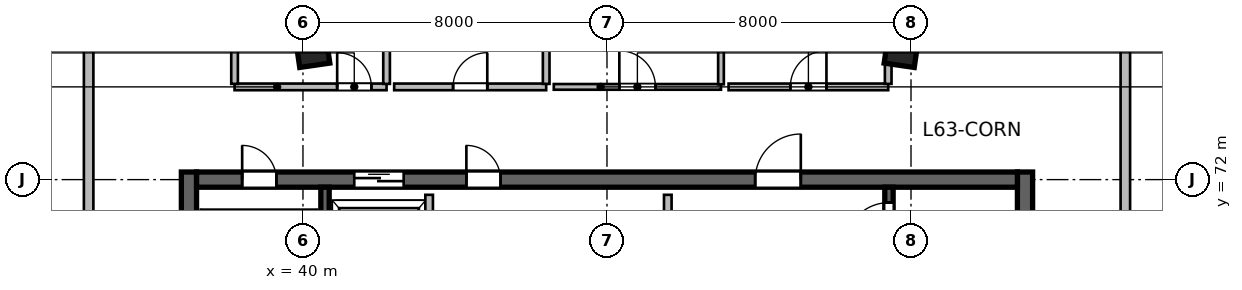
"""IFC4 building model, lengths in metres.
Left out: names, types, materials, properties, quantities, classifications, styles, units other than length and angle.
Written with IfcOpenShell. Run it as: python <this file> out.ifc"""

import sys

from ifc_helpers import new_model, si_unit, direction, frame, frame_2d, origin, origin_2d, place, context, subcontext, project, spatial, rectangle, extrude, source, transform, mapped, element, fill, save


model = new_model("IFC4")
c1 = context("Model", 3, precision=1e-05, world=origin(), true_north=direction((0.0, 1.0)))
c2 = subcontext(c1, "Body", "Model", "MODEL_VIEW")
j1 = project(units=[si_unit("LENGTHUNIT", "METRE"), si_unit("PLANEANGLEUNIT", "RADIAN")], contexts=[c1])
p1 = place(None, origin())
s1 = spatial("IfcSite", under=j1, at=p1, CompositionType="ELEMENT")
p2 = place(p1, origin())
s2 = spatial("IfcBuilding", under=s1, at=p2, CompositionType="ELEMENT")
p3 = place(p2, frame((0.0, 0.0, 260.1)))
s3 = spatial("IfcBuildingStorey", under=s2, at=p3, CompositionType="ELEMENT", Elevation=260.1)
m1 = source(origin(), c2, "Body", "SweptSolid", [
    extrude(rectangle(XDim=12.0, YDim=0.4, at=frame_2d((6.0, 0.0))), origin(), (0.0, 0.0, 1.0), 3.9),
])
for number, where, z_axis, x_axis in (
    (1, (37.0, 60.2, 0.0), (0.0, 0.0, 1.0), (0.0, 1.0, 0.0)),
    (2, (59.0, 60.2, 0.0), (0.0, 0.0, 1.0), (0.0, 1.0, 0.0)),
):
    element("IfcWall", number, at=place(p3, frame(where, z_axis=z_axis, x_axis=x_axis)), inside=s3, PredefinedType="SHEAR", context=c2, shape_type="MappedRepresentation", body=[
        mapped(m1, transform((0.0, 0.0, 0.0), scale=1.0)),
    ])
m2 = source(origin(), c2, "Body", "SweptSolid", [
    extrude(rectangle(XDim=21.6, YDim=0.4, at=frame_2d((10.8, 0.0))), origin(), (0.0, 0.0, 1.0), 3.9),
])
p4 = place(p3, frame((37.2, 72.0, 0.0), z_axis=(0.0, 0.0, 1.0), x_axis=(1.0, 0.0, 0.0)))
e3 = element("IfcWall", 3, at=p4, inside=s3, PredefinedType="SHEAR", context=c2, shape_type="MappedRepresentation", body=[
    mapped(m2, transform((0.0, 0.0, 0.0), scale=1.0)),
])
p5 = place(p4, frame((1.2, 0.0, 0.0)))
e4 = element("IfcOpeningElement", 4, at=p5, cuts=e3, PredefinedType="OPENING", context=c2, shape_type="SweptSolid", body=[
    extrude(rectangle(XDim=0.9, YDim=2.1, at=frame_2d((0.45, 1.05))), frame((0.0, 0.21, 0.0), z_axis=(0.0, -1.0, 0.0), x_axis=(1.0, 0.0, 0.0)), (0.0, 0.0, 1.0), 0.42),
])
p6 = place(p4, frame((14.7, 0.0, 0.0)))
e5 = element("IfcOpeningElement", 5, at=p6, cuts=e3, PredefinedType="OPENING", context=c2, shape_type="SweptSolid", body=[
    extrude(rectangle(XDim=1.2, YDim=2.15, at=frame_2d((0.6, 1.075))), frame((0.0, 0.21, 0.0), z_axis=(0.0, -1.0, 0.0), x_axis=(1.0, 0.0, 0.0)), (0.0, 0.0, 1.0), 0.42),
])
p7 = place(p4, frame((4.15, 0.0, 0.0)))
e6 = element("IfcOpeningElement", 6, at=p7, cuts=e3, PredefinedType="OPENING", context=c2, shape_type="SweptSolid", body=[
    extrude(rectangle(XDim=1.3, YDim=2.15, at=frame_2d((0.65, 1.075))), frame((0.0, 0.21, 0.0), z_axis=(0.0, -1.0, 0.0), x_axis=(1.0, 0.0, 0.0)), (0.0, 0.0, 1.0), 0.42),
])
p8 = place(p4, frame((7.1, 0.0, 0.0)))
e7 = element("IfcOpeningElement", 7, at=p8, cuts=e3, PredefinedType="OPENING", context=c2, shape_type="SweptSolid", body=[
    extrude(rectangle(XDim=0.9, YDim=2.1, at=frame_2d((0.45, 1.05))), frame((0.0, 0.21, 0.0), z_axis=(0.0, -1.0, 0.0), x_axis=(1.0, 0.0, 0.0)), (0.0, 0.0, 1.0), 0.42),
])
m3 = source(origin(), c2, "Body", "SweptSolid", [
    extrude(rectangle(XDim=11.2, YDim=0.22, at=frame_2d((5.6, 0.0))), origin(), (0.0, 0.0, 1.0), 3.9),
])
p9 = place(p3, frame((40.58, 60.6, 0.0), z_axis=(0.0, 0.0, 1.0), x_axis=(0.0, 1.0, 0.0)))
e8 = element("IfcWall", 8, at=p9, inside=s3, PredefinedType="SHEAR", context=c2, shape_type="MappedRepresentation", body=[
    mapped(m3, transform((0.0, 0.0, 0.0), scale=1.0)),
])
p10 = place(p3, frame((55.42, 60.6, 0.0), z_axis=(0.0, 0.0, 1.0), x_axis=(0.0, 1.0, 0.0)))
e9 = element("IfcWall", 9, at=p10, inside=s3, PredefinedType="SHEAR", context=c2, shape_type="MappedRepresentation", body=[
    mapped(m3, transform((0.0, 0.0, 0.0), scale=1.0)),
])
p11 = place(p10, frame((9.645, 0.0, 0.0)))
e10 = element("IfcOpeningElement", 10, at=p11, cuts=e9, PredefinedType="OPENING", context=c2, shape_type="SweptSolid", body=[
    extrude(rectangle(XDim=1.15, YDim=2.15, at=frame_2d((0.575, 1.075))), frame((0.0, 0.12, 0.0), z_axis=(0.0, -1.0, 0.0), x_axis=(1.0, 0.0, 0.0)), (0.0, 0.0, 1.0), 0.24),
])
m4 = source(origin(), c2, "Body", "SweptSolid", [
    extrude(rectangle(XDim=0.8, YDim=0.8, at=origin_2d()), origin(), (0.0, 0.0, 1.0), 3.9),
])
for number, where, z_axis, x_axis in (
    (11, (40.253, 75.404, 0.0), (0.0, 0.0, 1.0), (-0.143, 0.99, 0.0)),
    (12, (55.747, 75.404, 0.0), (0.0, 0.0, 1.0), (0.143, 0.99, 0.0)),
):
    element("IfcColumn", number, at=place(p3, frame(where, z_axis=z_axis, x_axis=x_axis)), inside=s3, PredefinedType="COLUMN", context=c2, shape_type="MappedRepresentation", body=[
        mapped(m4, transform((0.0, 0.0, 0.0), scale=1.0)),
    ])
m5 = source(origin(), c2, "Body", "SweptSolid", [
    extrude(rectangle(XDim=5.8, YDim=0.2, at=frame_2d((2.9, 0.0))), origin(), (0.0, 0.0, 1.0), 3.65),
])
p12 = place(p3, frame((49.6, 65.8, 0.0), z_axis=(0.0, 0.0, 1.0), x_axis=(0.0, 1.0, 0.0)))
e13 = element("IfcWall", 13, at=p12, inside=s3, PredefinedType="SOLIDWALL", context=c2, shape_type="MappedRepresentation", body=[
    mapped(m5, transform((0.0, 0.0, 0.0), scale=1.0)),
])
m6 = source(origin(), c2, "Body", "SweptSolid", [
    extrude(rectangle(XDim=3.2, YDim=0.2, at=frame_2d((1.6, 0.0))), origin(), (0.0, 0.0, 1.0), 3.65),
])
p13 = place(p3, frame((43.32, 68.4, 0.0), z_axis=(0.0, 0.0, 1.0), x_axis=(0.0, 1.0, 0.0)))
e14 = element("IfcWall", 14, at=p13, inside=s3, PredefinedType="SOLIDWALL", context=c2, shape_type="MappedRepresentation", body=[
    mapped(m6, transform((0.0, 0.0, 0.0), scale=1.0)),
])
m7 = source(origin(), c2, "Body", "SweptSolid", [
    extrude(rectangle(XDim=4.0, YDim=0.175, at=frame_2d((2.0, 0.0))), origin(), (0.0, 0.0, 1.0), 3.65),
])
p14 = place(p3, frame((38.2, 74.44, 0.0), z_axis=(0.0, 0.0, 1.0), x_axis=(1.0, 0.0, 0.0)))
e15 = element("IfcWall", 15, at=p14, inside=s3, PredefinedType="PARTITIONING", context=c2, shape_type="MappedRepresentation", body=[
    mapped(m7, transform((0.0, 0.0, 0.0), scale=1.0)),
])
p15 = place(p14, frame((2.7, 0.0, 0.0)))
e16 = element("IfcOpeningElement", 16, at=p15, cuts=e15, PredefinedType="OPENING", context=c2, shape_type="SweptSolid", body=[
    extrude(rectangle(XDim=0.9, YDim=2.08, at=frame_2d((0.45, 1.04))), frame((0.0, 0.098, 0.0), z_axis=(0.0, -1.0, 0.0), x_axis=(1.0, 0.0, 0.0)), (0.0, 0.0, 1.0), 0.195),
])
m8 = source(origin(), c2, "Body", "SweptSolid", [
    extrude(rectangle(XDim=2.403, YDim=0.175, at=frame_2d((1.201, 0.0))), origin(), (0.0, 0.0, 1.0), 3.65),
])
for number, where, z_axis, x_axis in (
    (17, (38.2, 74.519, 0.0), (0.0, 0.0, 1.0), (0.0, 1.0, 0.0)),
    (18, (42.2, 74.519, 0.0), (0.0, 0.0, 1.0), (0.0, 1.0, 0.0)),
):
    element("IfcWall", number, at=place(p3, frame(where, z_axis=z_axis, x_axis=x_axis)), inside=s3, PredefinedType="PARTITIONING", context=c2, shape_type="MappedRepresentation", body=[
        mapped(m8, transform((0.0, 0.0, 0.0), scale=1.0)),
    ])
p16 = place(p3, frame((42.4, 74.44, 0.0), z_axis=(0.0, 0.0, 1.0), x_axis=(1.0, 0.0, 0.0)))
e19 = element("IfcWall", 19, at=p16, inside=s3, PredefinedType="PARTITIONING", context=c2, shape_type="MappedRepresentation", body=[
    mapped(m7, transform((0.0, 0.0, 0.0), scale=1.0)),
])
p17 = place(p16, frame((1.55, 0.0, 0.0)))
e20 = element("IfcOpeningElement", 20, at=p17, cuts=e19, PredefinedType="OPENING", context=c2, shape_type="SweptSolid", body=[
    extrude(rectangle(XDim=0.9, YDim=2.08, at=frame_2d((0.45, 1.04))), frame((0.0, 0.098, 0.0), z_axis=(0.0, -1.0, 0.0), x_axis=(1.0, 0.0, 0.0)), (0.0, 0.0, 1.0), 0.195),
])
p18 = place(p3, frame((46.4, 74.519, 0.0), z_axis=(0.0, 0.0, 1.0), x_axis=(0.0, 1.0, 0.0)))
e21 = element("IfcWall", 21, at=p18, inside=s3, PredefinedType="PARTITIONING", context=c2, shape_type="MappedRepresentation", body=[
    mapped(m8, transform((0.0, 0.0, 0.0), scale=1.0)),
])
m9 = source(origin(), c2, "Body", "SweptSolid", [
    extrude(rectangle(XDim=4.4, YDim=0.15, at=frame_2d((2.2, 0.0))), origin(), (0.0, 0.0, 1.0), 3.65),
])
p19 = place(p3, frame((46.6, 74.44, 0.0), z_axis=(0.0, 0.0, 1.0), x_axis=(1.0, 0.0, 0.0)))
e22 = element("IfcWall", 22, at=p19, inside=s3, PredefinedType="PARTITIONING", context=c2, shape_type="MappedRepresentation", body=[
    mapped(m9, transform((0.0, 0.0, 0.0), scale=1.0)),
])
p20 = place(p19, frame((1.725, 0.0, 0.0)))
e23 = element("IfcOpeningElement", 23, at=p20, cuts=e22, PredefinedType="OPENING", context=c2, shape_type="SweptSolid", body=[
    extrude(rectangle(XDim=0.95, YDim=2.1, at=frame_2d((0.475, 1.05))), frame((0.0, 0.085, 0.0), z_axis=(0.0, -1.0, 0.0), x_axis=(1.0, 0.0, 0.0)), (0.0, 0.0, 1.0), 0.17),
])
m10 = source(origin(), c2, "Body", "SweptSolid", [
    extrude(rectangle(XDim=2.425, YDim=0.15, at=frame_2d((1.212, 0.0))), origin(), (0.0, 0.0, 1.0), 3.65),
])
p21 = place(p3, frame((51.0, 74.508, 0.0), z_axis=(0.0, 0.0, 1.0), x_axis=(0.0, 1.0, 0.0)))
e24 = element("IfcWall", 24, at=p21, inside=s3, PredefinedType="PARTITIONING", context=c2, shape_type="MappedRepresentation", body=[
    mapped(m10, transform((0.0, 0.0, 0.0), scale=1.0)),
])
m11 = source(origin(), c2, "Body", "SweptSolid", [
    extrude(rectangle(XDim=4.2, YDim=0.175, at=frame_2d((2.1, 0.0))), origin(), (0.0, 0.0, 1.0), 3.65),
])
p22 = place(p3, frame((51.2, 74.44, 0.0), z_axis=(0.0, 0.0, 1.0), x_axis=(1.0, 0.0, 0.0)))
e25 = element("IfcWall", 25, at=p22, inside=s3, PredefinedType="PARTITIONING", context=c2, shape_type="MappedRepresentation", body=[
    mapped(m11, transform((0.0, 0.0, 0.0), scale=1.0)),
])
p23 = place(p22, frame((1.625, 0.0, 0.0)))
e26 = element("IfcOpeningElement", 26, at=p23, cuts=e25, PredefinedType="OPENING", context=c2, shape_type="SweptSolid", body=[
    extrude(rectangle(XDim=0.95, YDim=2.12, at=frame_2d((0.475, 1.06))), frame((0.0, 0.098, 0.0), z_axis=(0.0, -1.0, 0.0), x_axis=(1.0, 0.0, 0.0)), (0.0, 0.0, 1.0), 0.195),
])
p24 = place(p3, frame((55.4, 74.519, 0.0), z_axis=(0.0, 0.0, 1.0), x_axis=(0.0, 1.0, 0.0)))
e27 = element("IfcWall", 27, at=p24, inside=s3, PredefinedType="PARTITIONING", context=c2, shape_type="MappedRepresentation", body=[
    mapped(m8, transform((0.0, 0.0, 0.0), scale=1.0)),
])
m12 = source(origin(), c2, "Body", "SweptSolid", [
    extrude(rectangle(XDim=14.245, YDim=0.25, at=frame_2d((7.123, 0.0))), origin(), (0.0, 0.0, 1.0), 3.65),
])
p25 = place(p3, frame((34.36, 62.0, 0.0), z_axis=(0.0, 0.0, 1.0), x_axis=(0.0, 1.0, 0.0)))
e28 = element("IfcWall", 28, at=p25, inside=s3, PredefinedType="PARTITIONING", context=c2, shape_type="MappedRepresentation", body=[
    mapped(m12, transform((0.0, 0.0, 0.0), scale=1.0)),
])
p26 = place(p25, frame((6.573, 0.0, 0.0)))
e29 = element("IfcOpeningElement", 29, at=p26, cuts=e28, PredefinedType="OPENING", context=c2, shape_type="SweptSolid", body=[
    extrude(rectangle(XDim=1.1, YDim=2.15, at=frame_2d((0.55, 1.075))), frame((0.0, 0.135, 0.0), z_axis=(0.0, -1.0, 0.0), x_axis=(1.0, 0.0, 0.0)), (0.0, 0.0, 1.0), 0.27),
])
m13 = source(origin(), c2, "Body", "SweptSolid", [
    extrude(rectangle(XDim=11.445, YDim=0.25, at=frame_2d((5.722, 0.0))), origin(), (0.0, 0.0, 1.0), 3.65),
])
p27 = place(p3, frame((61.64, 64.8, 0.0), z_axis=(0.0, 0.0, 1.0), x_axis=(0.0, 1.0, 0.0)))
e30 = element("IfcWall", 30, at=p27, inside=s3, PredefinedType="PARTITIONING", context=c2, shape_type="MappedRepresentation", body=[
    mapped(m13, transform((0.0, 0.0, 0.0), scale=1.0)),
])
p28 = place(p27, frame((5.247, 0.0, 0.0)))
e31 = element("IfcOpeningElement", 31, at=p28, cuts=e30, PredefinedType="OPENING", context=c2, shape_type="SweptSolid", body=[
    extrude(rectangle(XDim=0.95, YDim=2.1, at=frame_2d((0.475, 1.05))), frame((0.0, 0.135, 0.0), z_axis=(0.0, -1.0, 0.0), x_axis=(1.0, 0.0, 0.0)), (0.0, 0.0, 1.0), 0.27),
])
m14 = source(origin(), c2, "Body", "SweptSolid", [
    extrude(rectangle(XDim=0.9, YDim=2.1, at=frame_2d((0.45, 1.05))), frame((0.0, 0.025, 0.0), z_axis=(0.0, -1.0, 0.0), x_axis=(1.0, 0.0, 0.0)), (0.0, 0.0, 1.0), 0.05),
])
p29 = place(p5, origin())
e32 = element("IfcDoor", 32, at=p29, inside=s3, OperationType="SINGLE_SWING_LEFT", PredefinedType="DOOR", context=c2, shape_type="MappedRepresentation", body=[
    mapped(m14, transform((0.0, 0.0, 0.0), scale=1.0)),
])
fill(e4, e32)
m15 = source(origin(), c2, "Body", "SweptSolid", [
    extrude(rectangle(XDim=1.15, YDim=2.15, at=frame_2d((0.575, 1.075))), frame((0.0, 0.025, 0.0), z_axis=(0.0, -1.0, 0.0), x_axis=(1.0, 0.0, 0.0)), (0.0, 0.0, 1.0), 0.05),
])
p30 = place(p11, origin())
e33 = element("IfcDoor", 33, at=p30, inside=s3, OperationType="SINGLE_SWING_LEFT", PredefinedType="DOOR", context=c2, shape_type="MappedRepresentation", body=[
    mapped(m15, transform((0.0, 0.0, 0.0), scale=1.0)),
])
fill(e10, e33)
m16 = source(origin(), c2, "Body", "SweptSolid", [
    extrude(rectangle(XDim=1.2, YDim=2.15, at=frame_2d((0.6, 1.075))), frame((0.0, 0.025, 0.0), z_axis=(0.0, -1.0, 0.0), x_axis=(1.0, 0.0, 0.0)), (0.0, 0.0, 1.0), 0.05),
])
p31 = place(p6, origin())
e34 = element("IfcDoor", 34, at=p31, inside=s3, OperationType="SINGLE_SWING_RIGHT", PredefinedType="DOOR", context=c2, shape_type="MappedRepresentation", body=[
    mapped(m16, transform((0.0, 0.0, 0.0), scale=1.0)),
])
fill(e5, e34)
m17 = source(origin(), c2, "Body", "SweptSolid", [
    extrude(rectangle(XDim=1.3, YDim=2.15, at=frame_2d((0.65, 1.075))), frame((0.0, 0.025, 0.0), z_axis=(0.0, -1.0, 0.0), x_axis=(1.0, 0.0, 0.0)), (0.0, 0.0, 1.0), 0.05),
])
p32 = place(p7, origin())
e35 = element("IfcDoor", 35, at=p32, inside=s3, OperationType="DOUBLE_DOOR_SLIDING", PredefinedType="DOOR", context=c2, shape_type="MappedRepresentation", body=[
    mapped(m17, transform((0.0, 0.0, 0.0), scale=1.0)),
])
fill(e6, e35)
p33 = place(p8, origin())
e36 = element("IfcDoor", 36, at=p33, inside=s3, OperationType="SINGLE_SWING_LEFT", PredefinedType="DOOR", context=c2, shape_type="MappedRepresentation", body=[
    mapped(m14, transform((0.0, 0.0, 0.0), scale=1.0)),
])
fill(e7, e36)
m18 = source(origin(), c2, "Body", "SweptSolid", [
    extrude(rectangle(XDim=0.9, YDim=2.08, at=frame_2d((0.45, 1.04))), frame((0.0, 0.025, 0.0), z_axis=(0.0, -1.0, 0.0), x_axis=(1.0, 0.0, 0.0)), (0.0, 0.0, 1.0), 0.05),
])
p34 = place(p15, origin())
e37 = element("IfcDoor", 37, at=p34, inside=s3, OperationType="SINGLE_SWING_LEFT", PredefinedType="DOOR", context=c2, shape_type="MappedRepresentation", body=[
    mapped(m18, transform((0.0, 0.0, 0.0), scale=1.0)),
])
fill(e16, e37)
p35 = place(p17, origin())
e38 = element("IfcDoor", 38, at=p35, inside=s3, OperationType="SINGLE_SWING_RIGHT", PredefinedType="DOOR", context=c2, shape_type="MappedRepresentation", body=[
    mapped(m18, transform((0.0, 0.0, 0.0), scale=1.0)),
])
fill(e20, e38)
m19 = source(origin(), c2, "Body", "SweptSolid", [
    extrude(rectangle(XDim=0.95, YDim=2.1, at=frame_2d((0.475, 1.05))), frame((0.0, 0.025, 0.0), z_axis=(0.0, -1.0, 0.0), x_axis=(1.0, 0.0, 0.0)), (0.0, 0.0, 1.0), 0.05),
])
p36 = place(p20, origin())
e39 = element("IfcDoor", 39, at=p36, inside=s3, OperationType="SINGLE_SWING_LEFT", PredefinedType="DOOR", context=c2, shape_type="MappedRepresentation", body=[
    mapped(m19, transform((0.0, 0.0, 0.0), scale=1.0)),
])
fill(e23, e39)
m20 = source(origin(), c2, "Body", "SweptSolid", [
    extrude(rectangle(XDim=0.95, YDim=2.12, at=frame_2d((0.475, 1.06))), frame((0.0, 0.025, 0.0), z_axis=(0.0, -1.0, 0.0), x_axis=(1.0, 0.0, 0.0)), (0.0, 0.0, 1.0), 0.05),
])
p37 = place(p23, origin())
e40 = element("IfcDoor", 40, at=p37, inside=s3, OperationType="SINGLE_SWING_RIGHT", PredefinedType="DOOR", context=c2, shape_type="MappedRepresentation", body=[
    mapped(m20, transform((0.0, 0.0, 0.0), scale=1.0)),
])
fill(e26, e40)
save(model, sys.argv[1])
